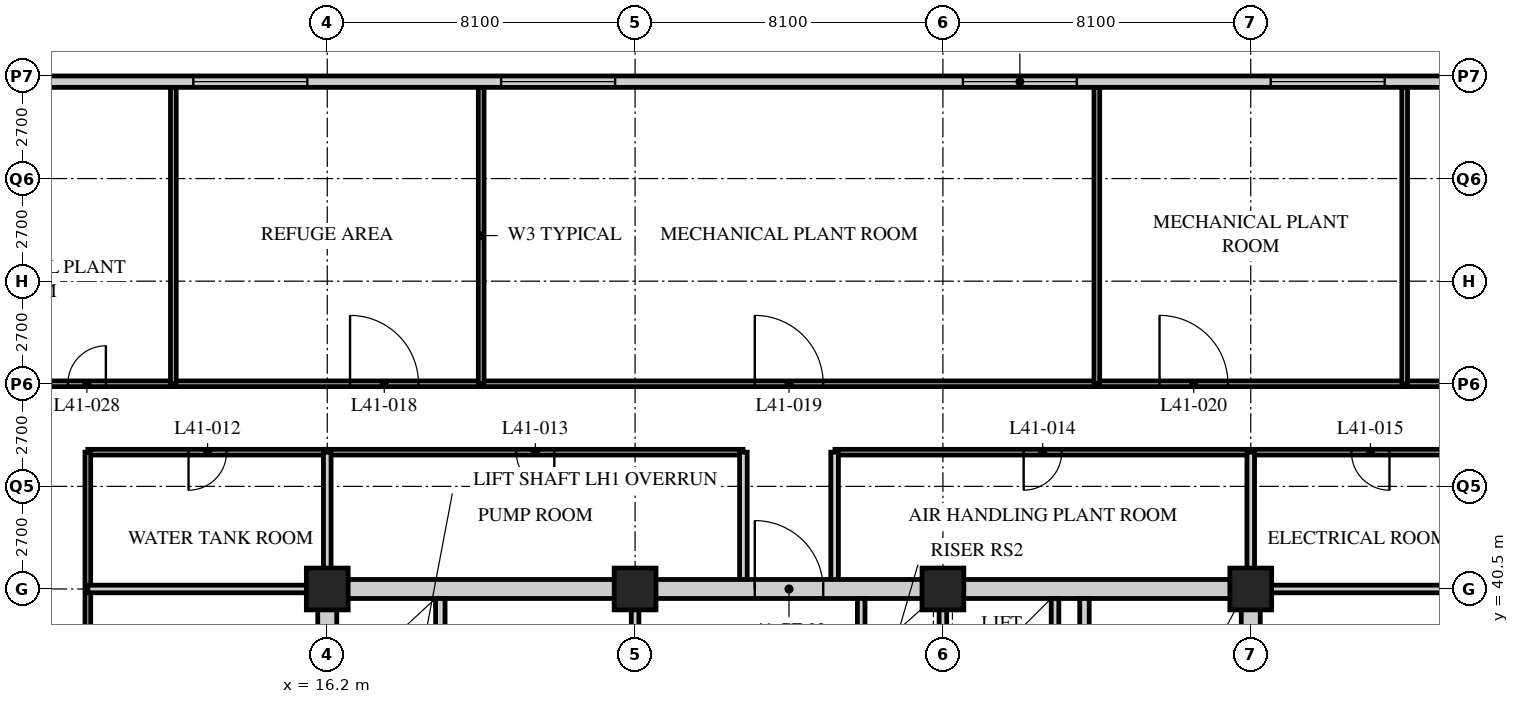
"""IFC4 building model, lengths in metres.
Left out: names, types, materials, properties, quantities, classifications, styles, units other than length and angle.
Written with IfcOpenShell. Run it as: python <this file> out.ifc"""

import sys

from ifc_helpers import new_model, si_unit, direction, frame, frame_2d, origin, origin_2d, place, context, subcontext, project, spatial, rectangle, hollow_rectangle, extrude, element, fill, save


model = new_model("IFC4")
c1 = context("Model", 3, precision=1e-05, world=origin(), true_north=direction((0.0, 1.0)))
c2 = subcontext(c1, "Body", "Model", "MODEL_VIEW")
j1 = project(units=[si_unit("LENGTHUNIT", "METRE"), si_unit("PLANEANGLEUNIT", "RADIAN")], contexts=[c1])
p1 = place(None, origin())
s1 = spatial("IfcSite", under=j1, at=p1, CompositionType="ELEMENT")
p2 = place(p1, origin())
s2 = spatial("IfcBuilding", under=s1, at=p2, CompositionType="ELEMENT")
p3 = place(p2, frame((0.0, 0.0, 157.8)))
s3 = spatial("IfcBuildingStorey", under=s2, at=p3, CompositionType="ELEMENT", Elevation=157.8)
for number, where, z_axis, x_axis in (
    (1, (16.2, 40.5, 0.0), (0.0, 0.0, 1.0), (1.0, 0.0, 0.0)),
    (2, (24.3, 40.5, 0.0), (0.0, 0.0, 1.0), (1.0, 0.0, 0.0)),
    (3, (32.4, 40.5, 0.0), (0.0, 0.0, 1.0), (1.0, 0.0, 0.0)),
    (4, (40.5, 40.5, 0.0), (0.0, 0.0, 1.0), (1.0, 0.0, 0.0)),
):
    element("IfcColumn", number, at=place(p3, frame(where, z_axis=z_axis, x_axis=x_axis)), inside=s3, PredefinedType="COLUMN", context=c2, shape_type="SweptSolid", body=[
        extrude(hollow_rectangle(XDim=1.1, YDim=1.1, WallThickness=0.1, at=origin_2d()), origin(), (0.0, 0.0, 1.0), 7.2),
    ])
p4 = place(p3, frame((48.3, 53.85, 0.0), z_axis=(0.0, 0.0, 1.0), x_axis=(-1.0, 0.0, 0.0)))
e5 = element("IfcWall", 5, at=p4, inside=s3, PredefinedType="SOLIDWALL", context=c2, shape_type="SweptSolid", body=[
    extrude(rectangle(XDim=40.2, YDim=0.3, at=frame_2d((20.1, 0.0))), origin(), (0.0, 0.0, 1.0), 5.95),
])
p5 = place(p4, frame((4.275, 0.0, 1.0)))
e6 = element("IfcOpeningElement", 6, at=p5, cuts=e5, PredefinedType="OPENING", context=c2, shape_type="SweptSolid", body=[
    extrude(rectangle(XDim=3.0, YDim=1.8, at=frame_2d((1.5, 0.9))), frame((0.0, 0.16, 0.0), z_axis=(0.0, -1.0, 0.0), x_axis=(1.0, 0.0, 0.0)), (0.0, 0.0, 1.0), 0.32),
])
p6 = place(p4, frame((12.375, 0.0, 1.0)))
e7 = element("IfcOpeningElement", 7, at=p6, cuts=e5, PredefinedType="OPENING", context=c2, shape_type="SweptSolid", body=[
    extrude(rectangle(XDim=3.0, YDim=1.8, at=frame_2d((1.5, 0.9))), frame((0.0, 0.16, 0.0), z_axis=(0.0, -1.0, 0.0), x_axis=(1.0, 0.0, 0.0)), (0.0, 0.0, 1.0), 0.32),
])
p7 = place(p4, frame((24.525, 0.0, 1.0)))
e8 = element("IfcOpeningElement", 8, at=p7, cuts=e5, PredefinedType="OPENING", context=c2, shape_type="SweptSolid", body=[
    extrude(rectangle(XDim=3.0, YDim=1.8, at=frame_2d((1.5, 0.9))), frame((0.0, 0.16, 0.0), z_axis=(0.0, -1.0, 0.0), x_axis=(1.0, 0.0, 0.0)), (0.0, 0.0, 1.0), 0.32),
])
p8 = place(p4, frame((32.625, 0.0, 1.0)))
e9 = element("IfcOpeningElement", 9, at=p8, cuts=e5, PredefinedType="OPENING", context=c2, shape_type="SweptSolid", body=[
    extrude(rectangle(XDim=3.0, YDim=1.8, at=frame_2d((1.5, 0.9))), frame((0.0, 0.16, 0.0), z_axis=(0.0, -1.0, 0.0), x_axis=(1.0, 0.0, 0.0)), (0.0, 0.0, 1.0), 0.32),
])
p9 = place(p3, frame((8.1, 45.9, 0.0), z_axis=(0.0, 0.0, 1.0), x_axis=(1.0, 0.0, 0.0)))
e10 = element("IfcWall", 10, at=p9, inside=s3, PredefinedType="PARTITIONING", context=c2, shape_type="SweptSolid", body=[
    extrude(rectangle(XDim=40.5, YDim=0.15, at=frame_2d((20.25, 0.0))), origin(), (0.0, 0.0, 1.0), 5.95),
])
p10 = place(p9, frame((8.7, 0.0, 0.0)))
e11 = element("IfcOpeningElement", 11, at=p10, cuts=e10, PredefinedType="OPENING", context=c2, shape_type="SweptSolid", body=[
    extrude(rectangle(XDim=1.8, YDim=2.4, at=frame_2d((0.9, 1.2))), frame((0.0, 0.085, 0.0), z_axis=(0.0, -1.0, 0.0), x_axis=(1.0, 0.0, 0.0)), (0.0, 0.0, 1.0), 0.17),
])
p11 = place(p9, frame((19.35, 0.0, 0.0)))
e12 = element("IfcOpeningElement", 12, at=p11, cuts=e10, PredefinedType="OPENING", context=c2, shape_type="SweptSolid", body=[
    extrude(rectangle(XDim=1.8, YDim=2.4, at=frame_2d((0.9, 1.2))), frame((0.0, 0.085, 0.0), z_axis=(0.0, -1.0, 0.0), x_axis=(1.0, 0.0, 0.0)), (0.0, 0.0, 1.0), 0.17),
])
p12 = place(p9, frame((30.0, 0.0, 0.0)))
e13 = element("IfcOpeningElement", 13, at=p12, cuts=e10, PredefinedType="OPENING", context=c2, shape_type="SweptSolid", body=[
    extrude(rectangle(XDim=1.8, YDim=2.4, at=frame_2d((0.9, 1.2))), frame((0.0, 0.085, 0.0), z_axis=(0.0, -1.0, 0.0), x_axis=(1.0, 0.0, 0.0)), (0.0, 0.0, 1.0), 0.17),
])
p13 = place(p9, frame((38.225, 0.0, 0.0)))
e14 = element("IfcOpeningElement", 14, at=p13, cuts=e10, PredefinedType="OPENING", context=c2, shape_type="SweptSolid", body=[
    extrude(rectangle(XDim=1.0, YDim=2.1, at=frame_2d((0.5, 1.05))), frame((0.0, 0.085, 0.0), z_axis=(0.0, -1.0, 0.0), x_axis=(1.0, 0.0, 0.0)), (0.0, 0.0, 1.0), 0.17),
])
p14 = place(p9, frame((1.275, 0.0, 0.0)))
e15 = element("IfcOpeningElement", 15, at=p14, cuts=e10, PredefinedType="OPENING", context=c2, shape_type="SweptSolid", body=[
    extrude(rectangle(XDim=1.0, YDim=2.1, at=frame_2d((0.5, 1.05))), frame((0.0, 0.085, 0.0), z_axis=(0.0, -1.0, 0.0), x_axis=(1.0, 0.0, 0.0)), (0.0, 0.0, 1.0), 0.17),
])
p15 = place(p3, frame((46.8, 44.1, 0.0), z_axis=(0.0, 0.0, 1.0), x_axis=(-1.0, 0.0, 0.0)))
e16 = element("IfcWall", 16, at=p15, inside=s3, PredefinedType="PARTITIONING", context=c2, shape_type="SweptSolid", body=[
    extrude(rectangle(XDim=17.24, YDim=0.15, at=frame_2d((8.62, 0.0))), origin(), (0.0, 0.0, 1.0), 6.95),
])
p16 = place(p15, frame((11.275, 0.0, 0.0)))
e17 = element("IfcOpeningElement", 17, at=p16, cuts=e16, PredefinedType="OPENING", context=c2, shape_type="SweptSolid", body=[
    extrude(rectangle(XDim=1.0, YDim=2.1, at=frame_2d((0.5, 1.05))), frame((0.0, 0.085, 0.0), z_axis=(0.0, -1.0, 0.0), x_axis=(1.0, 0.0, 0.0)), (0.0, 0.0, 1.0), 0.17),
])
p17 = place(p15, frame((2.65, 0.0, 0.0)))
e18 = element("IfcOpeningElement", 18, at=p17, cuts=e16, PredefinedType="OPENING", context=c2, shape_type="SweptSolid", body=[
    extrude(rectangle(XDim=1.0, YDim=2.1, at=frame_2d((0.5, 1.05))), frame((0.0, 0.085, 0.0), z_axis=(0.0, -1.0, 0.0), x_axis=(1.0, 0.0, 0.0)), (0.0, 0.0, 1.0), 0.17),
])
p18 = place(p3, frame((27.14, 44.1, 0.0), z_axis=(0.0, 0.0, 1.0), x_axis=(-1.0, 0.0, 0.0)))
e19 = element("IfcWall", 19, at=p18, inside=s3, PredefinedType="PARTITIONING", context=c2, shape_type="SweptSolid", body=[
    extrude(rectangle(XDim=17.24, YDim=0.15, at=frame_2d((8.62, 0.0))), origin(), (0.0, 0.0, 1.0), 6.95),
])
p19 = place(p18, frame((13.59, 0.0, 0.0)))
e20 = element("IfcOpeningElement", 20, at=p19, cuts=e19, PredefinedType="OPENING", context=c2, shape_type="SweptSolid", body=[
    extrude(rectangle(XDim=1.0, YDim=2.1, at=frame_2d((0.5, 1.05))), frame((0.0, 0.085, 0.0), z_axis=(0.0, -1.0, 0.0), x_axis=(1.0, 0.0, 0.0)), (0.0, 0.0, 1.0), 0.17),
])
p20 = place(p18, frame((4.965, 0.0, 0.0)))
e21 = element("IfcOpeningElement", 21, at=p20, cuts=e19, PredefinedType="OPENING", context=c2, shape_type="SweptSolid", body=[
    extrude(rectangle(XDim=1.0, YDim=2.1, at=frame_2d((0.5, 1.05))), frame((0.0, 0.085, 0.0), z_axis=(0.0, -1.0, 0.0), x_axis=(1.0, 0.0, 0.0)), (0.0, 0.0, 1.0), 0.17),
])
p21 = place(p3, frame((9.9, 44.1, 0.0), z_axis=(0.0, 0.0, 1.0), x_axis=(0.0, -1.0, 0.0)))
e22 = element("IfcWall", 22, at=p21, inside=s3, PredefinedType="PARTITIONING", context=c2, shape_type="SweptSolid", body=[
    extrude(rectangle(XDim=28.8, YDim=0.15, at=frame_2d((14.4, 0.0))), origin(), (0.0, 0.0, 1.0), 6.95),
])
p22 = place(p21, frame((17.575, 0.0, 0.0)))
e23 = element("IfcOpeningElement", 23, at=p22, cuts=e22, PredefinedType="OPENING", context=c2, shape_type="SweptSolid", body=[
    extrude(rectangle(XDim=0.85, YDim=2.1, at=frame_2d((0.425, 1.05))), frame((0.0, 0.085, 0.0), z_axis=(0.0, -1.0, 0.0), x_axis=(1.0, 0.0, 0.0)), (0.0, 0.0, 1.0), 0.17),
])
p23 = place(p21, frame((13.45, 0.0, 0.0)))
e24 = element("IfcOpeningElement", 24, at=p23, cuts=e22, PredefinedType="OPENING", context=c2, shape_type="SweptSolid", body=[
    extrude(rectangle(XDim=1.0, YDim=2.1, at=frame_2d((0.5, 1.05))), frame((0.0, 0.085, 0.0), z_axis=(0.0, -1.0, 0.0), x_axis=(1.0, 0.0, 0.0)), (0.0, 0.0, 1.0), 0.17),
])
p24 = place(p21, frame((9.475, 0.0, 0.0)))
e25 = element("IfcOpeningElement", 25, at=p24, cuts=e22, PredefinedType="OPENING", context=c2, shape_type="SweptSolid", body=[
    extrude(rectangle(XDim=0.85, YDim=2.1, at=frame_2d((0.425, 1.05))), frame((0.0, 0.085, 0.0), z_axis=(0.0, -1.0, 0.0), x_axis=(1.0, 0.0, 0.0)), (0.0, 0.0, 1.0), 0.17),
])
p25 = place(p21, frame((5.35, 0.0, 0.0)))
e26 = element("IfcOpeningElement", 26, at=p25, cuts=e22, PredefinedType="OPENING", context=c2, shape_type="SweptSolid", body=[
    extrude(rectangle(XDim=1.0, YDim=2.1, at=frame_2d((0.5, 1.05))), frame((0.0, 0.085, 0.0), z_axis=(0.0, -1.0, 0.0), x_axis=(1.0, 0.0, 0.0)), (0.0, 0.0, 1.0), 0.17),
])
for number, where, z_axis, x_axis in (
    (27, (16.2, 40.5, 0.0), (0.0, 0.0, 1.0), (0.0, 1.0, 0.0)),
    (28, (40.5, 40.5, 0.0), (0.0, 0.0, 1.0), (0.0, 1.0, 0.0)),
):
    element("IfcWall", number, at=place(p3, frame(where, z_axis=z_axis, x_axis=x_axis)), inside=s3, PredefinedType="SOLIDWALL", context=c2, shape_type="SweptSolid", body=[
        extrude(rectangle(XDim=3.6, YDim=0.2, at=frame_2d((1.8, 0.0))), origin(), (0.0, 0.0, 1.0), 5.95),
    ])
for number, where, z_axis, x_axis in (
    (29, (27.15, 40.5, 0.0), (0.0, 0.0, 1.0), (0.0, 1.0, 0.0)),
    (30, (29.55, 40.5, 0.0), (0.0, 0.0, 1.0), (0.0, 1.0, 0.0)),
):
    element("IfcWall", number, at=place(p3, frame(where, z_axis=z_axis, x_axis=x_axis)), inside=s3, PredefinedType="SOLIDWALL", context=c2, shape_type="SweptSolid", body=[
        extrude(rectangle(XDim=3.6, YDim=0.2, at=frame_2d((1.8, 0.0))), origin(), (0.0, 0.0, 1.0), 6.95),
    ])
for number, where, z_axis, x_axis in (
    (31, (9.9, 40.5, 0.0), (0.0, 0.0, 1.0), (1.0, 0.0, 0.0)),
    (32, (40.5, 40.5, 0.0), (0.0, 0.0, 1.0), (1.0, 0.0, 0.0)),
):
    element("IfcWall", number, at=place(p3, frame(where, z_axis=z_axis, x_axis=x_axis)), inside=s3, PredefinedType="SOLIDWALL", context=c2, shape_type="SweptSolid", body=[
        extrude(rectangle(XDim=6.3, YDim=0.2, at=frame_2d((3.15, 0.0))), origin(), (0.0, 0.0, 1.0), 6.95),
    ])
for number, where, z_axis, x_axis in (
    (33, (20.25, 45.9, 0.0), (0.0, 0.0, 1.0), (0.0, 1.0, 0.0)),
    (34, (36.45, 45.9, 0.0), (0.0, 0.0, 1.0), (0.0, 1.0, 0.0)),
    (35, (44.55, 45.9, 0.0), (0.0, 0.0, 1.0), (0.0, 1.0, 0.0)),
    (36, (12.15, 45.9, 0.0), (0.0, 0.0, 1.0), (0.0, 1.0, 0.0)),
):
    element("IfcWall", number, at=place(p3, frame(where, z_axis=z_axis, x_axis=x_axis)), inside=s3, PredefinedType="PARTITIONING", context=c2, shape_type="SweptSolid", body=[
        extrude(rectangle(XDim=7.8, YDim=0.15, at=frame_2d((3.9, 0.0))), origin(), (0.0, 0.0, 1.0), 6.95),
    ])
p26 = place(p3, frame((15.95, 40.5, 0.0), z_axis=(0.0, 0.0, 1.0), x_axis=(1.0, 0.0, 0.0)))
e37 = element("IfcWall", 37, at=p26, inside=s3, PredefinedType="SOLIDWALL", context=c2, shape_type="SweptSolid", body=[
    extrude(rectangle(XDim=24.8, YDim=0.5, at=frame_2d((12.4, 0.0))), origin(), (0.0, 0.0, 1.0), 6.18),
])
p27 = place(p26, frame((11.5, 0.0, 0.0)))
e38 = element("IfcOpeningElement", 38, at=p27, cuts=e37, PredefinedType="OPENING", context=c2, shape_type="SweptSolid", body=[
    extrude(rectangle(XDim=1.8, YDim=2.4, at=frame_2d((0.9, 1.2))), frame((0.0, 0.26, 0.0), z_axis=(0.0, -1.0, 0.0), x_axis=(1.0, 0.0, 0.0)), (0.0, 0.0, 1.0), 0.52),
])
for number, where, z_axis, x_axis in (
    (39, (16.2, 24.55, 0.0), (0.0, 0.0, 1.0), (0.0, 1.0, 0.0)),
    (40, (40.5, 24.55, 0.0), (0.0, 0.0, 1.0), (0.0, 1.0, 0.0)),
):
    element("IfcWall", number, at=place(p3, frame(where, z_axis=z_axis, x_axis=x_axis)), inside=s3, PredefinedType="SOLIDWALL", context=c2, shape_type="SweptSolid", body=[
        extrude(rectangle(XDim=15.7, YDim=0.5, at=frame_2d((7.85, 0.0))), origin(), (0.0, 0.0, 1.0), 5.95),
    ])
p28 = place(p3, frame((19.175, 32.5, 0.0), z_axis=(0.0, 0.0, 1.0), x_axis=(0.0, 1.0, 0.0)))
e41 = element("IfcWall", 41, at=p28, inside=s3, PredefinedType="SOLIDWALL", context=c2, shape_type="SweptSolid", body=[
    extrude(rectangle(XDim=7.75, YDim=0.25, at=frame_2d((3.875, 0.0))), origin(), (0.0, 0.0, 1.0), 6.95),
])
p29 = place(p3, frame((32.4, 32.5, 0.0), z_axis=(0.0, 0.0, 1.0), x_axis=(0.0, 1.0, 0.0)))
e42 = element("IfcWall", 42, at=p29, inside=s3, PredefinedType="SOLIDWALL", context=c2, shape_type="SweptSolid", body=[
    extrude(rectangle(XDim=7.75, YDim=0.2, at=frame_2d((3.875, 0.0))), origin(), (0.0, 0.0, 1.0), 6.25),
])
p30 = place(p29, frame((1.9, 0.0, 0.0)))
e43 = element("IfcOpeningElement", 43, at=p30, cuts=e42, PredefinedType="OPENING", context=c2, shape_type="SweptSolid", body=[
    extrude(rectangle(XDim=1.2, YDim=2.1, at=frame_2d((0.6, 1.05))), frame((0.0, 0.11, 0.0), z_axis=(0.0, -1.0, 0.0), x_axis=(1.0, 0.0, 0.0)), (0.0, 0.0, 1.0), 0.22),
])
p31 = place(p3, frame((36.125, 32.5, 0.0), z_axis=(0.0, 0.0, 1.0), x_axis=(0.0, 1.0, 0.0)))
e44 = element("IfcWall", 44, at=p31, inside=s3, PredefinedType="SOLIDWALL", context=c2, shape_type="SweptSolid", body=[
    extrude(rectangle(XDim=7.75, YDim=0.25, at=frame_2d((3.875, 0.0))), origin(), (0.0, 0.0, 1.0), 6.95),
])
p32 = place(p31, frame((0.45, 0.0, 0.0)))
e45 = element("IfcOpeningElement", 45, at=p32, cuts=e44, PredefinedType="OPENING", context=c2, shape_type="SweptSolid", body=[
    extrude(rectangle(XDim=1.2, YDim=2.1, at=frame_2d((0.6, 1.05))), frame((0.0, 0.135, 0.0), z_axis=(0.0, -1.0, 0.0), x_axis=(1.0, 0.0, 0.0)), (0.0, 0.0, 1.0), 0.27),
])
p33 = place(p3, frame((35.35, 37.65, 0.0), z_axis=(0.0, 0.0, 1.0), x_axis=(0.0, 1.0, 0.0)))
e46 = element("IfcWall", 46, at=p33, inside=s3, PredefinedType="SOLIDWALL", context=c2, shape_type="SweptSolid", body=[
    extrude(rectangle(XDim=2.6, YDim=0.2, at=frame_2d((1.3, 0.0))), origin(), (0.0, 0.0, 1.0), 6.95),
])
p34 = place(p3, frame((30.25, 38.65, 0.0), z_axis=(0.0, 0.0, 1.0), x_axis=(0.0, 1.0, 0.0)))
e47 = element("IfcWall", 47, at=p34, inside=s3, PredefinedType="SOLIDWALL", context=c2, shape_type="SweptSolid", body=[
    extrude(rectangle(XDim=1.6, YDim=0.2, at=frame_2d((0.8, 0.0))), origin(), (0.0, 0.0, 1.0), 6.95),
])
p35 = place(p3, frame((24.3, 32.5, 0.0), z_axis=(0.0, 0.0, 1.0), x_axis=(0.0, 1.0, 0.0)))
e48 = element("IfcWall", 48, at=p35, inside=s3, PredefinedType="PARTITIONING", context=c2, shape_type="SweptSolid", body=[
    extrude(rectangle(XDim=7.75, YDim=0.2, at=frame_2d((3.875, 0.0))), origin(), (0.0, 0.0, 1.0), 6.25),
])
p36 = place(p35, frame((1.35, 0.0, 0.0)))
e49 = element("IfcOpeningElement", 49, at=p36, cuts=e48, PredefinedType="OPENING", context=c2, shape_type="SweptSolid", body=[
    extrude(rectangle(XDim=0.9, YDim=2.1, at=frame_2d((0.45, 1.05))), frame((0.0, 0.11, 0.0), z_axis=(0.0, -1.0, 0.0), x_axis=(1.0, 0.0, 0.0)), (0.0, 0.0, 1.0), 0.22),
])
p37 = place(p35, frame((5.3, 0.0, 0.0)))
e50 = element("IfcOpeningElement", 50, at=p37, cuts=e48, PredefinedType="OPENING", context=c2, shape_type="SweptSolid", body=[
    extrude(rectangle(XDim=0.9, YDim=2.1, at=frame_2d((0.45, 1.05))), frame((0.0, 0.11, 0.0), z_axis=(0.0, -1.0, 0.0), x_axis=(1.0, 0.0, 0.0)), (0.0, 0.0, 1.0), 0.22),
])
p38 = place(p5, origin())
e51 = element("IfcWindow", 51, at=p38, inside=s3, PartitioningType="SINGLE_PANEL", PredefinedType="USERDEFINED", context=c2, shape_type="SweptSolid", body=[
    extrude(rectangle(XDim=3.0, YDim=1.8, at=frame_2d((1.5, 0.9))), frame((0.0, 0.075, 0.0), z_axis=(0.0, -1.0, 0.0), x_axis=(1.0, 0.0, 0.0)), (0.0, 0.0, 1.0), 0.15),
])
fill(e6, e51)
p39 = place(p6, origin())
e52 = element("IfcWindow", 52, at=p39, inside=s3, PartitioningType="SINGLE_PANEL", PredefinedType="USERDEFINED", context=c2, shape_type="SweptSolid", body=[
    extrude(rectangle(XDim=3.0, YDim=1.8, at=frame_2d((1.5, 0.9))), frame((0.0, 0.075, 0.0), z_axis=(0.0, -1.0, 0.0), x_axis=(1.0, 0.0, 0.0)), (0.0, 0.0, 1.0), 0.15),
])
fill(e7, e52)
p40 = place(p7, origin())
e53 = element("IfcWindow", 53, at=p40, inside=s3, PartitioningType="SINGLE_PANEL", PredefinedType="USERDEFINED", context=c2, shape_type="SweptSolid", body=[
    extrude(rectangle(XDim=3.0, YDim=1.8, at=frame_2d((1.5, 0.9))), frame((0.0, 0.075, 0.0), z_axis=(0.0, -1.0, 0.0), x_axis=(1.0, 0.0, 0.0)), (0.0, 0.0, 1.0), 0.15),
])
fill(e8, e53)
p41 = place(p8, origin())
e54 = element("IfcWindow", 54, at=p41, inside=s3, PartitioningType="SINGLE_PANEL", PredefinedType="USERDEFINED", context=c2, shape_type="SweptSolid", body=[
    extrude(rectangle(XDim=3.0, YDim=1.8, at=frame_2d((1.5, 0.9))), frame((0.0, 0.075, 0.0), z_axis=(0.0, -1.0, 0.0), x_axis=(1.0, 0.0, 0.0)), (0.0, 0.0, 1.0), 0.15),
])
fill(e9, e54)
p42 = place(p19, origin())
e55 = element("IfcDoor", 55, at=p42, inside=s3, OperationType="SINGLE_SWING_RIGHT", PredefinedType="DOOR", context=c2, shape_type="SweptSolid", body=[
    extrude(rectangle(XDim=1.0, YDim=2.1, at=frame_2d((0.5, 1.05))), frame((0.0, 0.025, 0.0), z_axis=(0.0, -1.0, 0.0), x_axis=(1.0, 0.0, 0.0)), (0.0, 0.0, 1.0), 0.05),
])
fill(e20, e55)
p43 = place(p20, origin())
e56 = element("IfcDoor", 56, at=p43, inside=s3, OperationType="SINGLE_SWING_LEFT", PredefinedType="DOOR", context=c2, shape_type="SweptSolid", body=[
    extrude(rectangle(XDim=1.0, YDim=2.1, at=frame_2d((0.5, 1.05))), frame((0.0, 0.025, 0.0), z_axis=(0.0, -1.0, 0.0), x_axis=(1.0, 0.0, 0.0)), (0.0, 0.0, 1.0), 0.05),
])
fill(e21, e56)
p44 = place(p16, origin())
e57 = element("IfcDoor", 57, at=p44, inside=s3, OperationType="SINGLE_SWING_RIGHT", PredefinedType="DOOR", context=c2, shape_type="SweptSolid", body=[
    extrude(rectangle(XDim=1.0, YDim=2.1, at=frame_2d((0.5, 1.05))), frame((0.0, 0.025, 0.0), z_axis=(0.0, -1.0, 0.0), x_axis=(1.0, 0.0, 0.0)), (0.0, 0.0, 1.0), 0.05),
])
fill(e17, e57)
p45 = place(p17, origin())
e58 = element("IfcDoor", 58, at=p45, inside=s3, OperationType="SINGLE_SWING_LEFT", PredefinedType="DOOR", context=c2, shape_type="SweptSolid", body=[
    extrude(rectangle(XDim=1.0, YDim=2.1, at=frame_2d((0.5, 1.05))), frame((0.0, 0.025, 0.0), z_axis=(0.0, -1.0, 0.0), x_axis=(1.0, 0.0, 0.0)), (0.0, 0.0, 1.0), 0.05),
])
fill(e18, e58)
p46 = place(p10, origin())
e59 = element("IfcDoor", 59, at=p46, inside=s3, OperationType="DOUBLE_DOOR_SINGLE_SWING", PredefinedType="DOOR", context=c2, shape_type="SweptSolid", body=[
    extrude(rectangle(XDim=1.8, YDim=2.4, at=frame_2d((0.9, 1.2))), frame((0.0, 0.025, 0.0), z_axis=(0.0, -1.0, 0.0), x_axis=(1.0, 0.0, 0.0)), (0.0, 0.0, 1.0), 0.05),
])
fill(e11, e59)
p47 = place(p11, origin())
e60 = element("IfcDoor", 60, at=p47, inside=s3, OperationType="DOUBLE_DOOR_SINGLE_SWING", PredefinedType="DOOR", context=c2, shape_type="SweptSolid", body=[
    extrude(rectangle(XDim=1.8, YDim=2.4, at=frame_2d((0.9, 1.2))), frame((0.0, 0.025, 0.0), z_axis=(0.0, -1.0, 0.0), x_axis=(1.0, 0.0, 0.0)), (0.0, 0.0, 1.0), 0.05),
])
fill(e12, e60)
p48 = place(p12, origin())
e61 = element("IfcDoor", 61, at=p48, inside=s3, OperationType="DOUBLE_DOOR_SINGLE_SWING", PredefinedType="DOOR", context=c2, shape_type="SweptSolid", body=[
    extrude(rectangle(XDim=1.8, YDim=2.4, at=frame_2d((0.9, 1.2))), frame((0.0, 0.025, 0.0), z_axis=(0.0, -1.0, 0.0), x_axis=(1.0, 0.0, 0.0)), (0.0, 0.0, 1.0), 0.05),
])
fill(e13, e61)
p49 = place(p14, origin())
e62 = element("IfcDoor", 62, at=p49, inside=s3, OperationType="SINGLE_SWING_RIGHT", PredefinedType="DOOR", context=c2, shape_type="SweptSolid", body=[
    extrude(rectangle(XDim=1.0, YDim=2.1, at=frame_2d((0.5, 1.05))), frame((0.0, 0.025, 0.0), z_axis=(0.0, -1.0, 0.0), x_axis=(1.0, 0.0, 0.0)), (0.0, 0.0, 1.0), 0.05),
])
fill(e15, e62)
p50 = place(p27, origin())
e63 = element("IfcDoor", 63, at=p50, inside=s3, OperationType="DOUBLE_DOOR_SINGLE_SWING", PredefinedType="DOOR", context=c2, shape_type="SweptSolid", body=[
    extrude(rectangle(XDim=1.8, YDim=2.4, at=frame_2d((0.9, 1.2))), frame((0.0, 0.025, 0.0), z_axis=(0.0, -1.0, 0.0), x_axis=(1.0, 0.0, 0.0)), (0.0, 0.0, 1.0), 0.05),
])
fill(e38, e63)
save(model, sys.argv[1])
